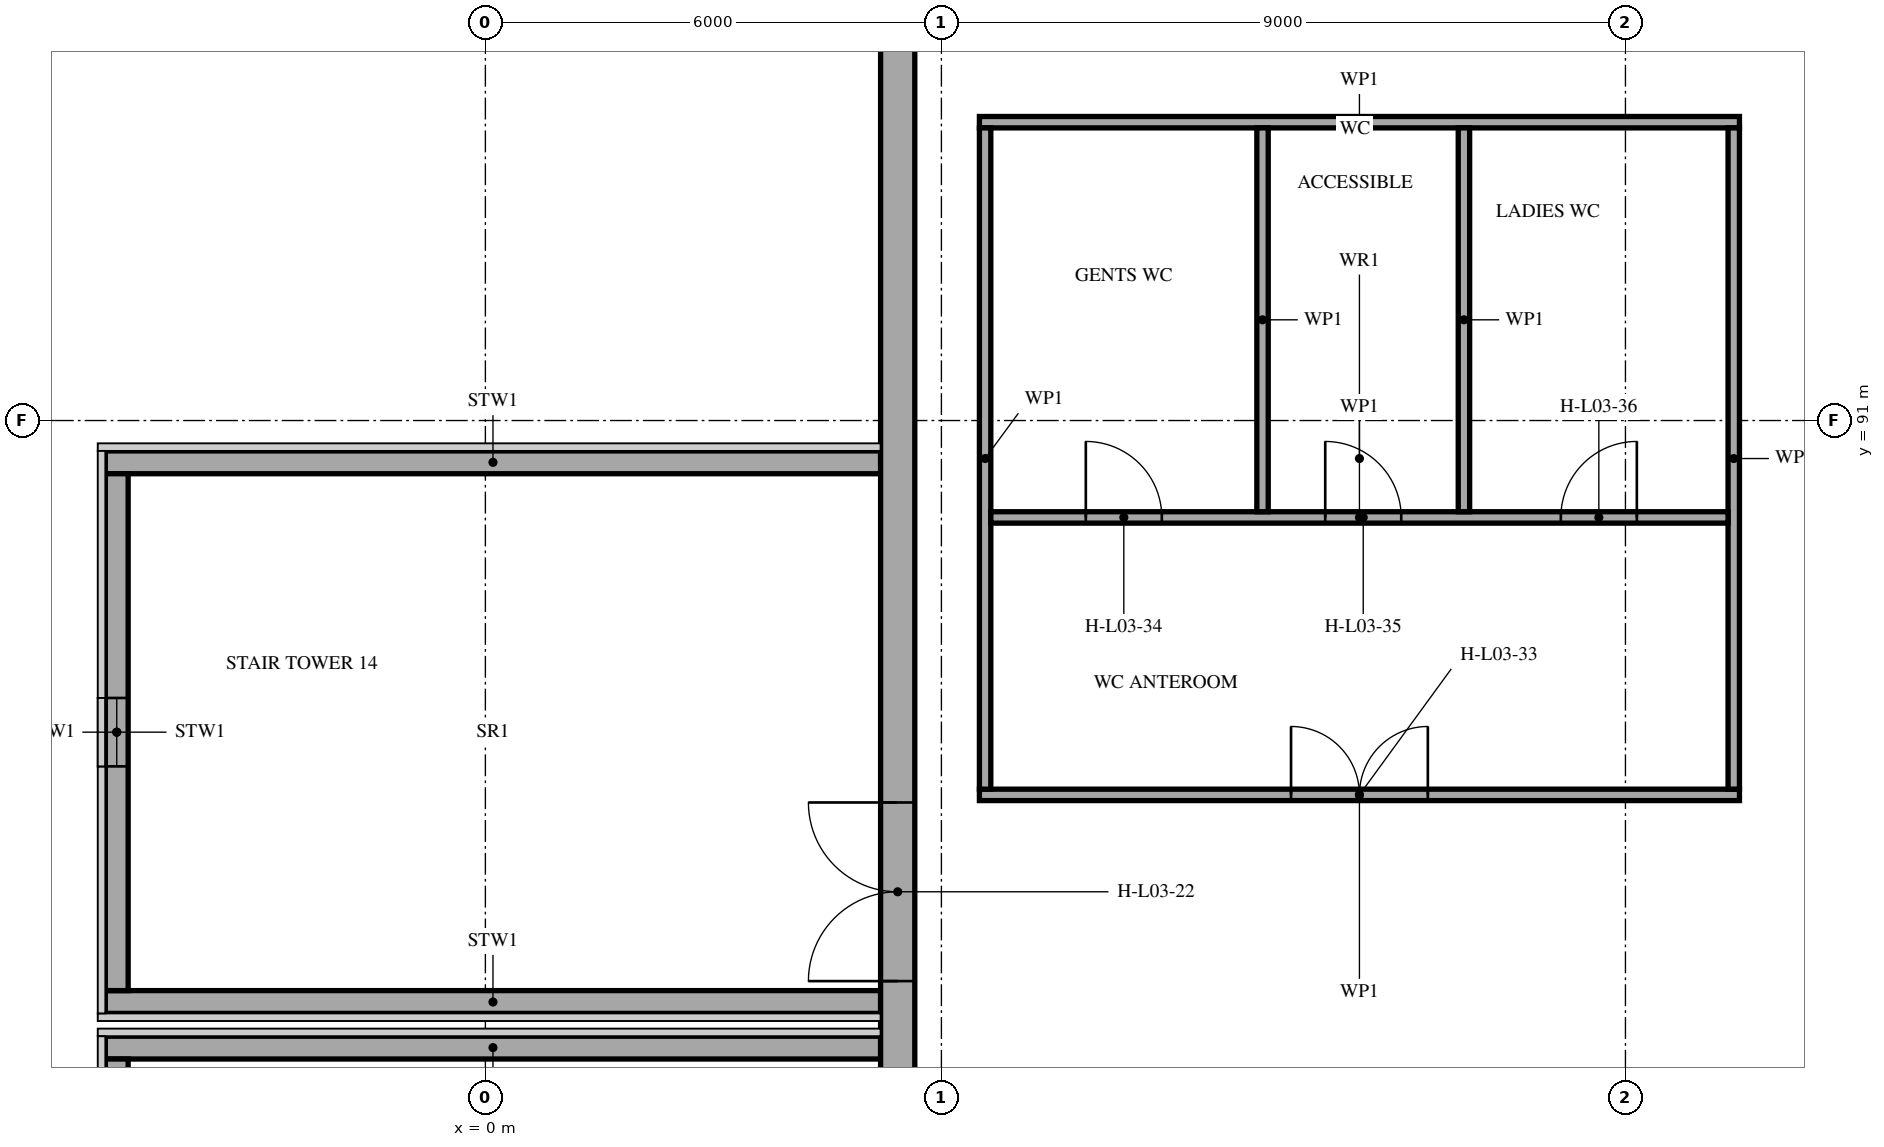
"""IFC4 building model, lengths in metres.
Left out: names, types, materials, properties, quantities, classifications, styles, units other than length and angle.
Written with IfcOpenShell. Run it as: python <this file> out.ifc"""

import sys

from ifc_helpers import new_model, si_unit, direction, frame, frame_2d, origin, place, context, subcontext, project, spatial, rectangle, extrude, element, fill, save


model = new_model("IFC4")
c1 = context("Model", 3, precision=1e-05, world=origin(), true_north=direction((0.0, 1.0)))
c2 = subcontext(c1, "Body", "Model", "MODEL_VIEW")
j1 = project(units=[si_unit("LENGTHUNIT", "METRE"), si_unit("PLANEANGLEUNIT", "RADIAN")], contexts=[c1])
p1 = place(None, origin())
s1 = spatial("IfcSite", under=j1, at=p1, CompositionType="ELEMENT")
p2 = place(p1, origin())
s2 = spatial("IfcBuilding", under=s1, at=p2, CompositionType="ELEMENT")
p3 = place(p2, frame((0.0, 0.0, 15.0)))
s3 = spatial("IfcBuildingStorey", under=s2, at=p3, CompositionType="ELEMENT", Elevation=15.0)
p4 = place(p3, frame((5.2, 82.75, 0.0), z_axis=(0.0, 0.0, 1.0), x_axis=(-1.0, 0.0, 0.0)))
e1 = element("IfcWall", 1, at=p4, inside=s3, PredefinedType="SHEAR", context=c2, shape_type="SweptSolid", body=[
    extrude(rectangle(XDim=10.2, YDim=0.3, at=frame_2d((5.1, 0.0))), origin(), (0.0, 0.0, 1.0), 3.9),
])
p5 = place(p3, frame((-4.85, 75.8, 0.0), z_axis=(0.0, 0.0, 1.0), x_axis=(0.0, 1.0, 0.0)))
e2 = element("IfcWall", 2, at=p5, inside=s3, PredefinedType="SHEAR", context=c2, shape_type="SweptSolid", body=[
    extrude(rectangle(XDim=6.8, YDim=0.3, at=frame_2d((3.4, 0.0))), origin(), (0.0, 0.0, 1.0), 3.9),
])
p6 = place(p5, frame((2.95, 0.0, 1.0)))
e3 = element("IfcOpeningElement", 3, at=p6, cuts=e2, PredefinedType="OPENING", context=c2, shape_type="SweptSolid", body=[
    extrude(rectangle(XDim=0.9, YDim=1.5, at=frame_2d((0.45, 0.75))), frame((0.0, 0.16, 0.0), z_axis=(0.0, -1.0, 0.0), x_axis=(1.0, 0.0, 0.0)), (0.0, 0.0, 1.0), 0.32),
])
for number, where, z_axis, x_axis in (
    (4, (5.2, 83.35, 0.0), (0.0, 0.0, 1.0), (-1.0, 0.0, 0.0)),
    (5, (5.2, 90.45, 0.0), (0.0, 0.0, 1.0), (-1.0, 0.0, 0.0)),
):
    element("IfcWall", number, at=place(p3, frame(where, z_axis=z_axis, x_axis=x_axis)), inside=s3, PredefinedType="SHEAR", context=c2, shape_type="SweptSolid", body=[
        extrude(rectangle(XDim=10.2, YDim=0.3, at=frame_2d((5.1, 0.0))), origin(), (0.0, 0.0, 1.0), 3.9),
    ])
p7 = place(p3, frame((-4.85, 83.5, 0.0), z_axis=(0.0, 0.0, 1.0), x_axis=(0.0, 1.0, 0.0)))
e6 = element("IfcWall", 6, at=p7, inside=s3, PredefinedType="SHEAR", context=c2, shape_type="SweptSolid", body=[
    extrude(rectangle(XDim=6.8, YDim=0.3, at=frame_2d((3.4, 0.0))), origin(), (0.0, 0.0, 1.0), 3.9),
])
p8 = place(p7, frame((2.95, 0.0, 1.0)))
e7 = element("IfcOpeningElement", 7, at=p8, cuts=e6, PredefinedType="OPENING", context=c2, shape_type="SweptSolid", body=[
    extrude(rectangle(XDim=0.9, YDim=1.5, at=frame_2d((0.45, 0.75))), frame((0.0, 0.16, 0.0), z_axis=(0.0, -1.0, 0.0), x_axis=(1.0, 0.0, 0.0)), (0.0, 0.0, 1.0), 0.32),
])
p9 = place(p3, frame((5.425, 46.75, 0.0), z_axis=(0.0, 0.0, 1.0), x_axis=(0.0, 1.0, 0.0)))
e8 = element("IfcWall", 8, at=p9, inside=s3, PredefinedType="SOLIDWALL", context=c2, shape_type="SweptSolid", body=[
    extrude(rectangle(XDim=61.65, YDim=0.45, at=frame_2d((30.825, 0.0))), origin(), (0.0, 0.0, 1.0), 4.2),
])
p10 = place(p9, frame((11.275, 0.0, 0.0)))
e9 = element("IfcOpeningElement", 9, at=p10, cuts=e8, PredefinedType="OPENING", context=c2, shape_type="SweptSolid", body=[
    extrude(rectangle(XDim=2.35, YDim=2.1, at=frame_2d((1.175, 1.05))), frame((0.0, 0.235, 0.0), z_axis=(0.0, -1.0, 0.0), x_axis=(1.0, 0.0, 0.0)), (0.0, 0.0, 1.0), 0.47),
])
p11 = place(p9, frame((31.275, 0.0, 0.0)))
e10 = element("IfcOpeningElement", 10, at=p11, cuts=e8, PredefinedType="OPENING", context=c2, shape_type="SweptSolid", body=[
    extrude(rectangle(XDim=2.35, YDim=2.1, at=frame_2d((1.175, 1.05))), frame((0.0, 0.235, 0.0), z_axis=(0.0, -1.0, 0.0), x_axis=(1.0, 0.0, 0.0)), (0.0, 0.0, 1.0), 0.47),
])
p12 = place(p9, frame((24.625, 0.0, 0.0)))
e11 = element("IfcOpeningElement", 11, at=p12, cuts=e8, PredefinedType="OPENING", context=c2, shape_type="SweptSolid", body=[
    extrude(rectangle(XDim=2.35, YDim=2.1, at=frame_2d((1.175, 1.05))), frame((0.0, 0.235, 0.0), z_axis=(0.0, -1.0, 0.0), x_axis=(1.0, 0.0, 0.0)), (0.0, 0.0, 1.0), 0.47),
])
p13 = place(p9, frame((36.875, 0.0, 0.0)))
e12 = element("IfcOpeningElement", 12, at=p13, cuts=e8, PredefinedType="OPENING", context=c2, shape_type="SweptSolid", body=[
    extrude(rectangle(XDim=2.35, YDim=2.1, at=frame_2d((1.175, 1.05))), frame((0.0, 0.235, 0.0), z_axis=(0.0, -1.0, 0.0), x_axis=(1.0, 0.0, 0.0)), (0.0, 0.0, 1.0), 0.47),
])
p14 = place(p9, frame((5.95, 0.0, 0.0)))
e13 = element("IfcOpeningElement", 13, at=p14, cuts=e8, PredefinedType="OPENING", context=c2, shape_type="SweptSolid", body=[
    extrude(rectangle(XDim=1.2, YDim=2.1, at=frame_2d((0.6, 1.05))), frame((0.0, 0.235, 0.0), z_axis=(0.0, -1.0, 0.0), x_axis=(1.0, 0.0, 0.0)), (0.0, 0.0, 1.0), 0.47),
])
p15 = place(p3, frame((6.5, 86.075, 0.0), z_axis=(0.0, 0.0, 1.0), x_axis=(1.0, 0.0, 0.0)))
e14 = element("IfcWall", 14, at=p15, inside=s3, PredefinedType="SOLIDWALL", context=c2, shape_type="SweptSolid", body=[
    extrude(rectangle(XDim=10.0, YDim=0.15, at=frame_2d((5.0, 0.0))), origin(), (0.0, 0.0, 1.0), 3.45),
])
p16 = place(p15, frame((4.1, 0.0, 0.0)))
e15 = element("IfcOpeningElement", 15, at=p16, cuts=e14, PredefinedType="OPENING", context=c2, shape_type="SweptSolid", body=[
    extrude(rectangle(XDim=1.8, YDim=2.1, at=frame_2d((0.9, 1.05))), frame((0.0, 0.085, 0.0), z_axis=(0.0, -1.0, 0.0), x_axis=(1.0, 0.0, 0.0)), (0.0, 0.0, 1.0), 0.17),
])
p17 = place(p3, frame((6.5, 94.925, 0.0), z_axis=(0.0, 0.0, 1.0), x_axis=(1.0, 0.0, 0.0)))
e16 = element("IfcWall", 16, at=p17, inside=s3, PredefinedType="SOLIDWALL", context=c2, shape_type="SweptSolid", body=[
    extrude(rectangle(XDim=10.0, YDim=0.15, at=frame_2d((5.0, 0.0))), origin(), (0.0, 0.0, 1.0), 3.45),
])
for number, where, z_axis, x_axis in (
    (17, (6.575, 86.15, 0.0), (0.0, 0.0, 1.0), (0.0, 1.0, 0.0)),
    (18, (16.425, 86.15, 0.0), (0.0, 0.0, 1.0), (0.0, 1.0, 0.0)),
):
    element("IfcWall", number, at=place(p3, frame(where, z_axis=z_axis, x_axis=x_axis)), inside=s3, PredefinedType="SOLIDWALL", context=c2, shape_type="SweptSolid", body=[
        extrude(rectangle(XDim=8.7, YDim=0.15, at=frame_2d((4.35, 0.0))), origin(), (0.0, 0.0, 1.0), 3.45),
    ])
p18 = place(p3, frame((6.65, 89.725, 0.0), z_axis=(0.0, 0.0, 1.0), x_axis=(1.0, 0.0, 0.0)))
e19 = element("IfcWall", 19, at=p18, inside=s3, PredefinedType="SOLIDWALL", context=c2, shape_type="SweptSolid", body=[
    extrude(rectangle(XDim=9.7, YDim=0.15, at=frame_2d((4.85, 0.0))), origin(), (0.0, 0.0, 1.0), 3.45),
])
p19 = place(p18, frame((1.25, 0.0, 0.0)))
e20 = element("IfcOpeningElement", 20, at=p19, cuts=e19, PredefinedType="OPENING", context=c2, shape_type="SweptSolid", body=[
    extrude(rectangle(XDim=1.0, YDim=2.1, at=frame_2d((0.5, 1.05))), frame((0.0, 0.085, 0.0), z_axis=(0.0, -1.0, 0.0), x_axis=(1.0, 0.0, 0.0)), (0.0, 0.0, 1.0), 0.17),
])
p20 = place(p18, frame((4.4, 0.0, 0.0)))
e21 = element("IfcOpeningElement", 21, at=p20, cuts=e19, PredefinedType="OPENING", context=c2, shape_type="SweptSolid", body=[
    extrude(rectangle(XDim=1.0, YDim=2.1, at=frame_2d((0.5, 1.05))), frame((0.0, 0.085, 0.0), z_axis=(0.0, -1.0, 0.0), x_axis=(1.0, 0.0, 0.0)), (0.0, 0.0, 1.0), 0.17),
])
p21 = place(p18, frame((7.5, 0.0, 0.0)))
e22 = element("IfcOpeningElement", 22, at=p21, cuts=e19, PredefinedType="OPENING", context=c2, shape_type="SweptSolid", body=[
    extrude(rectangle(XDim=1.0, YDim=2.1, at=frame_2d((0.5, 1.05))), frame((0.0, 0.085, 0.0), z_axis=(0.0, -1.0, 0.0), x_axis=(1.0, 0.0, 0.0)), (0.0, 0.0, 1.0), 0.17),
])
for number, where, z_axis, x_axis in (
    (23, (10.225, 89.8, 0.0), (0.0, 0.0, 1.0), (0.0, 1.0, 0.0)),
    (24, (12.875, 89.8, 0.0), (0.0, 0.0, 1.0), (0.0, 1.0, 0.0)),
):
    element("IfcWall", number, at=place(p3, frame(where, z_axis=z_axis, x_axis=x_axis)), inside=s3, PredefinedType="SOLIDWALL", context=c2, shape_type="SweptSolid", body=[
        extrude(rectangle(XDim=5.05, YDim=0.15, at=frame_2d((2.525, 0.0))), origin(), (0.0, 0.0, 1.0), 3.45),
    ])
p22 = place(p13, origin())
e25 = element("IfcDoor", 25, at=p22, inside=s3, OperationType="DOUBLE_DOOR_SINGLE_SWING", PredefinedType="DOOR", context=c2, shape_type="SweptSolid", body=[
    extrude(rectangle(XDim=2.35, YDim=2.1, at=frame_2d((1.175, 1.05))), frame((0.0, 0.025, 0.0), z_axis=(0.0, -1.0, 0.0), x_axis=(1.0, 0.0, 0.0)), (0.0, 0.0, 1.0), 0.05),
])
fill(e12, e25)
p23 = place(p8, origin())
e26 = element("IfcWindow", 26, at=p23, inside=s3, PartitioningType="SINGLE_PANEL", PredefinedType="WINDOW", context=c2, shape_type="SweptSolid", body=[
    extrude(rectangle(XDim=0.9, YDim=1.5, at=frame_2d((0.45, 0.75))), frame((0.0, 0.03, 0.0), z_axis=(0.0, -1.0, 0.0), x_axis=(1.0, 0.0, 0.0)), (0.0, 0.0, 1.0), 0.06),
])
fill(e7, e26)
p24 = place(p16, origin())
e27 = element("IfcDoor", 27, at=p24, inside=s3, OperationType="DOUBLE_DOOR_SINGLE_SWING", PredefinedType="DOOR", context=c2, shape_type="SweptSolid", body=[
    extrude(rectangle(XDim=1.8, YDim=2.1, at=frame_2d((0.9, 1.05))), frame((0.0, 0.025, 0.0), z_axis=(0.0, -1.0, 0.0), x_axis=(1.0, 0.0, 0.0)), (0.0, 0.0, 1.0), 0.05),
])
fill(e15, e27)
p25 = place(p19, origin())
e28 = element("IfcDoor", 28, at=p25, inside=s3, OperationType="SINGLE_SWING_LEFT", PredefinedType="DOOR", context=c2, shape_type="SweptSolid", body=[
    extrude(rectangle(XDim=1.0, YDim=2.1, at=frame_2d((0.5, 1.05))), frame((0.0, 0.025, 0.0), z_axis=(0.0, -1.0, 0.0), x_axis=(1.0, 0.0, 0.0)), (0.0, 0.0, 1.0), 0.05),
])
fill(e20, e28)
p26 = place(p20, origin())
e29 = element("IfcDoor", 29, at=p26, inside=s3, OperationType="SINGLE_SWING_LEFT", PredefinedType="DOOR", context=c2, shape_type="SweptSolid", body=[
    extrude(rectangle(XDim=1.0, YDim=2.1, at=frame_2d((0.5, 1.05))), frame((0.0, 0.025, 0.0), z_axis=(0.0, -1.0, 0.0), x_axis=(1.0, 0.0, 0.0)), (0.0, 0.0, 1.0), 0.05),
])
fill(e21, e29)
p27 = place(p21, origin())
e30 = element("IfcDoor", 30, at=p27, inside=s3, OperationType="SINGLE_SWING_RIGHT", PredefinedType="DOOR", context=c2, shape_type="SweptSolid", body=[
    extrude(rectangle(XDim=1.0, YDim=2.1, at=frame_2d((0.5, 1.05))), frame((0.0, 0.025, 0.0), z_axis=(0.0, -1.0, 0.0), x_axis=(1.0, 0.0, 0.0)), (0.0, 0.0, 1.0), 0.05),
])
fill(e22, e30)
save(model, sys.argv[1])
